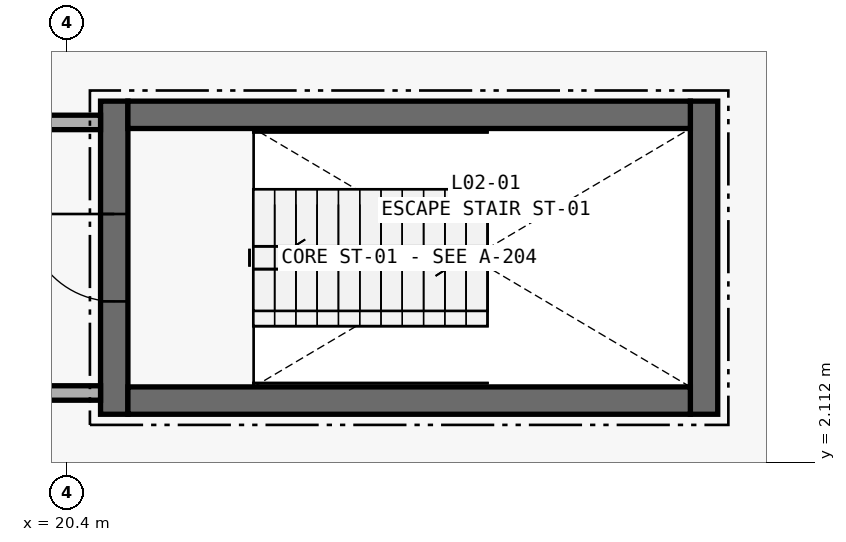
"""IFC4 building model, lengths in metres.
Left out: names, types, materials, properties, quantities, classifications, styles, units other than length and angle.
Written with IfcOpenShell. Run it as: python <this file> out.ifc"""

import sys

from ifc_helpers import new_model, si_unit, direction, frame, frame_2d, origin, place, context, subcontext, project, spatial, rectangle, extrude, element, fill, save


model = new_model("IFC4")
c1 = context("Model", 3, precision=1e-05, world=origin(), true_north=direction((0.0, 1.0)))
c2 = subcontext(c1, "Body", "Model", "MODEL_VIEW")
j1 = project(units=[si_unit("LENGTHUNIT", "METRE"), si_unit("PLANEANGLEUNIT", "RADIAN")], contexts=[c1])
p1 = place(None, origin())
s1 = spatial("IfcSite", under=j1, at=p1, CompositionType="ELEMENT")
p2 = place(p1, origin())
s2 = spatial("IfcBuilding", under=s1, at=p2, CompositionType="ELEMENT")
p3 = place(p2, frame((0.0, 0.0, 9.0)))
s3 = spatial("IfcBuildingStorey", under=s2, at=p3, CompositionType="ELEMENT", Elevation=9.0)
p4 = place(p3, frame((21.02, 2.74, 0.0), z_axis=(0.0, 0.0, 1.0), x_axis=(0.0, 1.0, 0.0)))
e1 = element("IfcWall", 1, at=p4, inside=s3, PredefinedType="SHEAR", context=c2, shape_type="SweptSolid", body=[
    extrude(rectangle(XDim=4.12, YDim=0.36, at=frame_2d((2.06, 0.0))), origin(), (0.0, 0.0, 1.0), 7.82),
])
p5 = place(p4, frame((1.485, 0.0, 0.0)))
e2 = element("IfcOpeningElement", 2, at=p5, cuts=e1, PredefinedType="OPENING", context=c2, shape_type="SweptSolid", body=[
    extrude(rectangle(XDim=1.15, YDim=2.15, at=frame_2d((0.575, 1.075))), frame((0.0, 0.195, 0.0), z_axis=(0.0, -1.0, 0.0), x_axis=(1.0, 0.0, 0.0)), (0.0, 0.0, 1.0), 0.39),
])
p6 = place(p3, frame((28.78, 2.74, 0.0), z_axis=(0.0, 0.0, 1.0), x_axis=(0.0, 1.0, 0.0)))
e3 = element("IfcWall", 3, at=p6, inside=s3, PredefinedType="SHEAR", context=c2, shape_type="SweptSolid", body=[
    extrude(rectangle(XDim=4.12, YDim=0.36, at=frame_2d((2.06, 0.0))), origin(), (0.0, 0.0, 1.0), 7.82),
])
for number, where, z_axis, x_axis in (
    (4, (21.2, 6.68, 0.0), (0.0, 0.0, 1.0), (1.0, 0.0, 0.0)),
    (5, (21.2, 2.92, 0.0), (0.0, 0.0, 1.0), (1.0, 0.0, 0.0)),
):
    element("IfcWall", number, at=place(p3, frame(where, z_axis=z_axis, x_axis=x_axis)), inside=s3, PredefinedType="SHEAR", context=c2, shape_type="SweptSolid", body=[
        extrude(rectangle(XDim=7.4, YDim=0.36, at=frame_2d((3.7, 0.0))), origin(), (0.0, 0.0, 1.0), 7.82),
    ])
p7 = place(p3, frame((16.825, 3.02, 0.0), z_axis=(0.0, 0.0, 1.0), x_axis=(1.0, 0.0, 0.0)))
e6 = element("IfcWall", 6, at=p7, inside=s3, PredefinedType="PARTITIONING", context=c2, shape_type="SweptSolid", body=[
    extrude(rectangle(XDim=4.015, YDim=0.19, at=frame_2d((2.008, 0.0))), origin(), (0.0, 0.0, 1.0), 6.7),
])
p8 = place(p3, frame((19.685, 6.58, 0.0), z_axis=(0.0, 0.0, 1.0), x_axis=(1.0, 0.0, 0.0)))
e7 = element("IfcWall", 7, at=p8, inside=s3, PredefinedType="PARTITIONING", context=c2, shape_type="SweptSolid", body=[
    extrude(rectangle(XDim=1.155, YDim=0.19, at=frame_2d((0.578, 0.0))), origin(), (0.0, 0.0, 1.0), 6.7),
])
p9 = place(p5, origin())
e8 = element("IfcDoor", 8, at=p9, inside=s3, OperationType="SINGLE_SWING_RIGHT", PredefinedType="DOOR", context=c2, shape_type="SweptSolid", body=[
    extrude(rectangle(XDim=1.15, YDim=2.15, at=frame_2d((0.575, 1.075))), frame((0.0, 0.025, 0.0), z_axis=(0.0, -1.0, 0.0), x_axis=(1.0, 0.0, 0.0)), (0.0, 0.0, 1.0), 0.05),
])
fill(e2, e8)
save(model, sys.argv[1])
